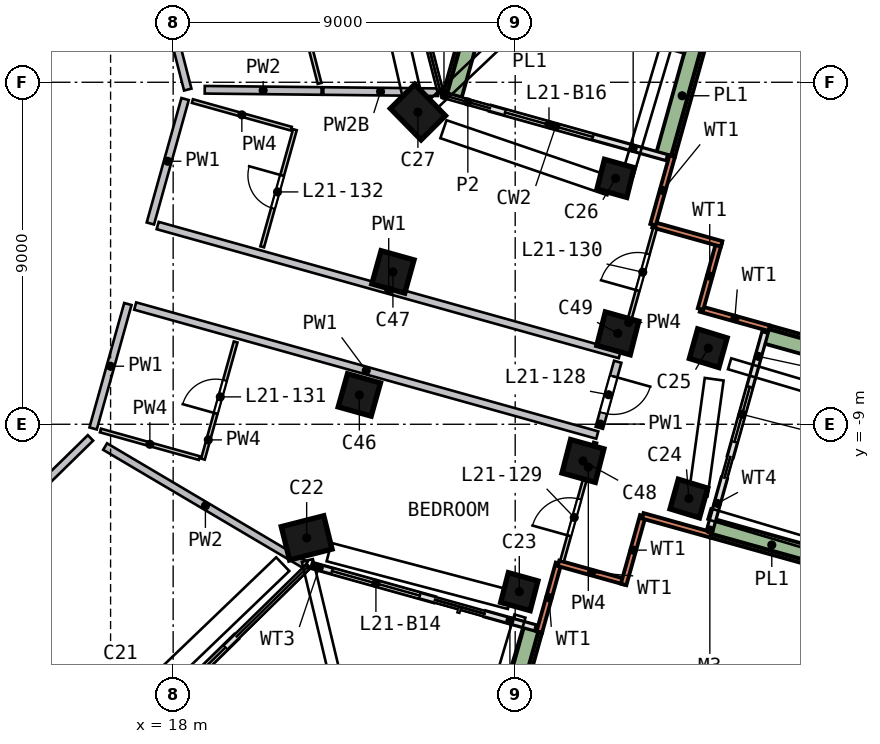
"""IFC4 building model, lengths in metres.
Left out: names, types, materials, properties, quantities, classifications, styles, units other than length and angle.
Written with IfcOpenShell. Run it as: python <this file> out.ifc"""

import sys

from ifc_helpers import new_model, si_unit, direction, frame, frame_2d, origin, origin_2d, place, context, subcontext, project, spatial, rectangle, extrude, element, fill, save


model = new_model("IFC4")
c1 = context("Model", 3, precision=1e-05, world=origin(), true_north=direction((0.0, 1.0)))
c2 = subcontext(c1, "Body", "Model", "MODEL_VIEW")
j1 = project(units=[si_unit("LENGTHUNIT", "METRE"), si_unit("PLANEANGLEUNIT", "RADIAN")], contexts=[c1])
p1 = place(None, origin())
s1 = spatial("IfcSite", under=j1, at=p1, CompositionType="ELEMENT")
p2 = place(p1, origin())
s2 = spatial("IfcBuilding", under=s1, at=p2, CompositionType="ELEMENT")
p3 = place(p2, frame((0.0, 0.0, 93.0)))
s3 = spatial("IfcBuildingStorey", under=s2, at=p3, CompositionType="ELEMENT", Elevation=93.0)
p4 = place(p3, frame((21.444, -12.113, 0.0), z_axis=(0.056777694, 0.102458276, 0.9931156), x_axis=(-0.96720596, -0.24101204, 0.080161264)))
e1 = element("IfcColumn", 1, at=p4, inside=s3, PredefinedType="COLUMN", context=c2, shape_type="SweptSolid", body=[
    extrude(rectangle(XDim=1.15, YDim=0.9, at=origin_2d()), origin(), (0.0, 0.0, 1.0), 3.212),
])
p5 = place(p3, frame((27.215, -13.61, 0.0), z_axis=(-0.087402917, 0.167741453, 0.981948845), x_axis=(0.959938643, -0.249254836, 0.128022764)))
e2 = element("IfcColumn", 2, at=p5, inside=s3, PredefinedType="COLUMN", context=c2, shape_type="SweptSolid", body=[
    extrude(rectangle(XDim=0.8, YDim=0.8, at=origin_2d()), origin(), (0.0, 0.0, 1.0), 3.249),
])
p6 = place(p3, frame((31.692, -11.185, 0.0), z_axis=(-0.098430583, 0.187736141, 0.97727507), x_axis=(0.287692097, 0.945479062, -0.152651894)))
e3 = element("IfcColumn", 3, at=p6, inside=s3, PredefinedType="COLUMN", context=c2, shape_type="SweptSolid", body=[
    extrude(rectangle(XDim=0.8, YDim=0.8, at=origin_2d()), origin(), (0.0, 0.0, 1.0), 3.264),
])
p7 = place(p3, frame((32.225, -7.232, 0.0), z_axis=(-0.116769501, 0.189591887, 0.974894764), x_axis=(0.289566517, 0.945460339, -0.149184381)))
e4 = element("IfcColumn", 4, at=p7, inside=s3, PredefinedType="COLUMN", context=c2, shape_type="SweptSolid", body=[
    extrude(rectangle(XDim=0.8, YDim=0.8, at=origin_2d()), origin(), (0.0, 0.0, 1.0), 3.272),
])
p8 = place(p3, frame((29.812, -2.748, 0.0), z_axis=(-0.137511181, 0.178078471, 0.974360679), x_axis=(-0.954072434, 0.240512077, -0.17860496)))
e5 = element("IfcColumn", 5, at=p8, inside=s3, PredefinedType="COLUMN", context=c2, shape_type="SweptSolid", body=[
    extrude(rectangle(XDim=0.8, YDim=0.8, at=origin_2d()), origin(), (0.0, 0.0, 1.0), 3.274),
])
p9 = place(p3, frame((24.436, -0.926, 0.0), z_axis=(0.003420691, 0.116227489, 0.993216728), x_axis=(0.702265044, -0.707365794, 0.08035821)))
e6 = element("IfcColumn", 6, at=p9, inside=s3, PredefinedType="COLUMN", context=c2, shape_type="SweptSolid", body=[
    extrude(rectangle(XDim=1.15, YDim=0.9, at=origin_2d()), origin(), (0.0, 0.0, 1.0), 3.212),
])
for number, where, z_axis, x_axis in (
    (7, (22.852, -8.36, 0.0), (0.039, 0.109, 0.993), (0.963, -0.27, -0.008)),
    (8, (23.755, -5.127, 0.0), (0.023, 0.113, 0.993), (0.963, -0.268, 0.008)),
):
    element("IfcColumn", number, at=place(p3, frame(where, z_axis=z_axis, x_axis=x_axis)), inside=s3, PredefinedType="COLUMN", context=c2, shape_type="SweptSolid", body=[
        extrude(rectangle(XDim=0.9, YDim=0.9, at=origin_2d()), origin(), (0.0, 0.0, 1.0), 3.211),
    ])
p10 = place(p3, frame((28.91, -10.18, 0.0), z_axis=(-0.103337522, 0.175051814, 0.979121146), x_axis=(0.958440948, -0.245651379, 0.145073602)))
e9 = element("IfcColumn", 9, at=p10, inside=s3, PredefinedType="COLUMN", context=c2, shape_type="SweptSolid", body=[
    extrude(rectangle(XDim=0.9, YDim=0.9, at=origin_2d()), origin(), (0.0, 0.0, 1.0), 3.258),
])
p11 = place(p3, frame((29.846, -6.828, 0.0), z_axis=(-0.118703121, 0.178876933, 0.9766845), x_axis=(0.956551914, -0.243211576, 0.160799766)))
e10 = element("IfcColumn", 10, at=p11, inside=s3, PredefinedType="COLUMN", context=c2, shape_type="SweptSolid", body=[
    extrude(rectangle(XDim=0.9, YDim=0.9, at=origin_2d()), origin(), (0.0, 0.0, 1.0), 3.266),
])
p12 = place(p3, frame((27.635, -14.465, 0.0), z_axis=(0.0, 0.0, 1.0), x_axis=(0.268886057, 0.963171993, 0.0)))
e11 = element("IfcWall", 11, at=p12, inside=s3, PredefinedType="SOLIDWALL", context=c2, shape_type="SweptSolid", body=[
    extrude(rectangle(XDim=1.875, YDim=0.15, at=frame_2d((0.938, 0.0))), origin(), (0.0, 0.0, 1.0), 3.19),
])
p13 = place(p3, frame((28.14, -12.659, 0.0), z_axis=(0.0, 0.0, 1.0), x_axis=(0.963159547, -0.268930637, 0.0)))
e12 = element("IfcWall", 12, at=p13, inside=s3, PredefinedType="SOLIDWALL", context=c2, shape_type="SweptSolid", body=[
    extrude(rectangle(XDim=1.8, YDim=0.15, at=frame_2d((0.9, 0.0))), origin(), (0.0, 0.0, 1.0), 3.19),
])
for number, where, z_axis, x_axis in (
    (13, (29.853, -13.215, 0.0), (0.0, 0.0, 1.0), (0.269, 0.963, 0.0)),
    (14, (30.357, -11.409, 0.0), (0.0, 0.0, 1.0), (0.963, -0.269, 0.0)),
    (15, (33.683, -6.471, 0.0), (0.0, 0.0, 1.0), (-0.963, 0.269, 0.0)),
):
    element("IfcWall", number, at=place(p3, frame(where, z_axis=z_axis, x_axis=x_axis)), inside=s3, PredefinedType="SOLIDWALL", context=c2, shape_type="SweptSolid", body=[
        extrude(rectangle(XDim=1.875, YDim=0.15, at=frame_2d((0.938, 0.0))), origin(), (0.0, 0.0, 1.0), 3.19),
    ])
p14 = place(p3, frame((31.877, -5.967, 0.0), z_axis=(0.0, 0.0, 1.0), x_axis=(0.268839939, 0.963184867, 0.0)))
e16 = element("IfcWall", 16, at=p14, inside=s3, PredefinedType="SOLIDWALL", context=c2, shape_type="SweptSolid", body=[
    extrude(rectangle(XDim=1.8, YDim=0.15, at=frame_2d((0.9, 0.0))), origin(), (0.0, 0.0, 1.0), 3.19),
])
p15 = place(p3, frame((32.433, -4.254, 0.0), z_axis=(0.0, 0.0, 1.0), x_axis=(-0.963171993, 0.268886057, 0.0)))
e17 = element("IfcWall", 17, at=p15, inside=s3, PredefinedType="SOLIDWALL", context=c2, shape_type="SweptSolid", body=[
    extrude(rectangle(XDim=1.875, YDim=0.15, at=frame_2d((0.938, 0.0))), origin(), (0.0, 0.0, 1.0), 3.19),
])
p16 = place(p3, frame((30.627, -3.75, 0.0), z_axis=(0.0, 0.0, 1.0), x_axis=(0.268973117, 0.963147685, 0.0)))
e18 = element("IfcWall", 18, at=p16, inside=s3, PredefinedType="SOLIDWALL", context=c2, shape_type="SweptSolid", body=[
    extrude(rectangle(XDim=1.875, YDim=0.15, at=frame_2d((0.938, 0.0))), origin(), (0.0, 0.0, 1.0), 3.19),
])
p17 = place(p3, frame((16.92, -17.278, 0.0), z_axis=(0.0, 0.0, 1.0), x_axis=(0.714483248, 0.699652549, 0.0)))
e19 = element("IfcWall", 19, at=p17, inside=s3, PredefinedType="SOLIDWALL", context=c2, shape_type="SweptSolid", body=[
    extrude(rectangle(XDim=3.836, YDim=0.15, at=frame_2d((1.918, 0.0))), origin(), (0.0, 0.0, 1.0), 2.425),
])
p18 = place(p17, frame((1.035, 0.0, 0.0)))
e20 = element("IfcOpeningElement", 20, at=p18, cuts=e19, PredefinedType="OPENING", context=c2, shape_type="SweptSolid", body=[
    extrude(rectangle(XDim=2.4, YDim=2.4, at=frame_2d((1.2, 1.2))), frame((0.0, 0.085, 0.0), z_axis=(0.0, -1.0, 0.0), x_axis=(1.0, 0.0, 0.0)), (0.0, 0.0, 1.0), 0.17),
])
p19 = place(p3, frame((21.704, -12.731, 0.0), z_axis=(0.0, 0.0, 1.0), x_axis=(0.963162375, -0.268920509, 0.0)))
e21 = element("IfcWall", 21, at=p19, inside=s3, PredefinedType="SOLIDWALL", context=c2, shape_type="SweptSolid", body=[
    extrude(rectangle(XDim=3.294, YDim=0.15, at=frame_2d((1.647, 0.0))), origin(), (0.0, 0.0, 1.0), 2.425),
])
p20 = place(p19, frame((0.494, 0.0, 0.0)))
e22 = element("IfcOpeningElement", 22, at=p20, cuts=e21, PredefinedType="OPENING", context=c2, shape_type="SweptSolid", body=[
    extrude(rectangle(XDim=2.4, YDim=2.4, at=frame_2d((1.2, 1.2))), frame((0.0, 0.085, 0.0), z_axis=(0.0, -1.0, 0.0), x_axis=(1.0, 0.0, 0.0)), (0.0, 0.0, 1.0), 0.17),
])
p21 = place(p3, frame((26.206, -13.988, 0.0), z_axis=(0.0, 0.0, 1.0), x_axis=(0.96315954, -0.26893066, 0.0)))
e23 = element("IfcWall", 23, at=p21, inside=s3, PredefinedType="SOLIDWALL", context=c2, shape_type="SweptSolid", body=[
    extrude(rectangle(XDim=1.36, YDim=0.15, at=frame_2d((0.68, 0.0))), origin(), (0.0, 0.0, 1.0), 2.425),
])
p22 = place(p3, frame((32.663, -9.846, 0.0), z_axis=(0.0, 0.0, 1.0), x_axis=(0.268917758, 0.963163143, 0.0)))
e24 = element("IfcWall", 24, at=p22, inside=s3, PredefinedType="SOLIDWALL", context=c2, shape_type="SweptSolid", body=[
    extrude(rectangle(XDim=3.37, YDim=0.15, at=frame_2d((1.685, 0.0))), origin(), (0.0, 0.0, 1.0), 2.425),
])
p23 = place(p22, frame((0.4, 0.0, 0.0)))
e25 = element("IfcOpeningElement", 25, at=p23, cuts=e24, PredefinedType="OPENING", context=c2, shape_type="SweptSolid", body=[
    extrude(rectangle(XDim=1.5, YDim=2.4, at=frame_2d((0.75, 1.2))), frame((0.0, 0.085, 0.0), z_axis=(0.0, -1.0, 0.0), x_axis=(1.0, 0.0, 0.0)), (0.0, 0.0, 1.0), 0.17),
])
p24 = place(p3, frame((32.133, -11.744, 0.0), z_axis=(0.0, 0.0, 1.0), x_axis=(0.268990627, 0.963142794, 0.0)))
e26 = element("IfcWall", 26, at=p24, inside=s3, PredefinedType="SOLIDWALL", context=c2, shape_type="SweptSolid", body=[
    extrude(rectangle(XDim=1.374, YDim=0.15, at=frame_2d((0.687, 0.0))), origin(), (0.0, 0.0, 1.0), 2.425),
])
p25 = place(p3, frame((30.972, -1.977, 0.0), z_axis=(0.0, 0.0, 1.0), x_axis=(-0.963157095, 0.268939419, 0.0)))
e27 = element("IfcWall", 27, at=p25, inside=s3, PredefinedType="SOLIDWALL", context=c2, shape_type="SweptSolid", body=[
    extrude(rectangle(XDim=4.8, YDim=0.15, at=frame_2d((2.4, 0.0))), origin(), (0.0, 0.0, 1.0), 2.425),
])
p26 = place(p25, frame((2.0, 0.0, 0.0)))
e28 = element("IfcOpeningElement", 28, at=p26, cuts=e27, PredefinedType="OPENING", context=c2, shape_type="SweptSolid", body=[
    extrude(rectangle(XDim=2.4, YDim=2.4, at=frame_2d((1.2, 1.2))), frame((0.0, 0.085, 0.0), z_axis=(0.0, -1.0, 0.0), x_axis=(1.0, 0.0, 0.0)), (0.0, 0.0, 1.0), 0.17),
])
p27 = place(p3, frame((26.741, -17.018, 0.0), z_axis=(0.0, 0.0, 1.0), x_axis=(0.268921917, 0.963161982, 0.0)))
e29 = element("IfcWall", 29, at=p27, inside=s3, PredefinedType="SOLIDWALL", context=c2, shape_type="SweptSolid", body=[
    extrude(rectangle(XDim=2.699, YDim=0.5, at=frame_2d((1.35, 0.0))), origin(), (0.0, 0.0, 1.0), 0.7),
])
p28 = place(p3, frame((32.211, -11.745, 0.0), z_axis=(0.0, 0.0, 1.0), x_axis=(0.963159533, -0.268930686, 0.0)))
e30 = element("IfcWall", 30, at=p28, inside=s3, PredefinedType="SOLIDWALL", context=c2, shape_type="SweptSolid", body=[
    extrude(rectangle(XDim=3.199, YDim=0.5, at=frame_2d((1.6, 0.0))), origin(), (0.0, 0.0, 1.0), 0.7),
])
p29 = place(p3, frame((36.236, -7.366, 0.0), z_axis=(0.0, 0.0, 1.0), x_axis=(-0.963161982, 0.268921917, 0.0)))
e31 = element("IfcWall", 31, at=p29, inside=s3, PredefinedType="SOLIDWALL", context=c2, shape_type="SweptSolid", body=[
    extrude(rectangle(XDim=2.699, YDim=0.5, at=frame_2d((1.35, 0.0))), origin(), (0.0, 0.0, 1.0), 0.7),
])
p30 = place(p3, frame((30.963, -1.896, 0.0), z_axis=(0.0, 0.0, 1.0), x_axis=(0.268930686, 0.963159533, 0.0)))
e32 = element("IfcWall", 32, at=p30, inside=s3, PredefinedType="SOLIDWALL", context=c2, shape_type="SweptSolid", body=[
    extrude(rectangle(XDim=3.199, YDim=0.5, at=frame_2d((1.6, 0.0))), origin(), (0.0, 0.0, 1.0), 0.7),
])
p31 = place(p3, frame((31.515, 1.012, 0.0), z_axis=(0.0, 0.0, 1.0), x_axis=(-0.963162724, 0.268919258, 0.0)))
e33 = element("IfcWall", 33, at=p31, inside=s3, PredefinedType="SOLIDWALL", context=c2, shape_type="SweptSolid", body=[
    extrude(rectangle(XDim=5.824, YDim=0.5, at=frame_2d((2.912, 0.0))), origin(), (0.0, 0.0, 1.0), 0.7),
])
p32 = place(p3, frame((26.08, 2.27, 0.0), z_axis=(0.0, 0.0, 1.0), x_axis=(-0.268921917, -0.963161982, 0.0)))
e34 = element("IfcWall", 34, at=p32, inside=s3, PredefinedType="SOLIDWALL", context=c2, shape_type="SweptSolid", body=[
    extrude(rectangle(XDim=2.699, YDim=0.5, at=frame_2d((1.35, 0.0))), origin(), (0.0, 0.0, 1.0), 0.7),
])
p33 = place(p3, frame((9.025, -16.017, 0.0), z_axis=(0.0, 0.0, 1.0), x_axis=(0.714482371, 0.699653444, 0.0)))
e35 = element("IfcWall", 35, at=p33, inside=s3, PredefinedType="SOLIDWALL", context=c2, shape_type="SweptSolid", body=[
    extrude(rectangle(XDim=9.516, YDim=0.2, at=frame_2d((4.758, 0.0))), origin(), (0.0, 0.0, 1.0), 3.19),
])
p34 = place(p3, frame((15.894, -9.11, 0.0), z_axis=(0.0, 0.0, 1.0), x_axis=(0.268902762, 0.963167329, 0.0)))
e36 = element("IfcWall", 36, at=p34, inside=s3, PredefinedType="SOLIDWALL", context=c2, shape_type="SweptSolid", body=[
    extrude(rectangle(XDim=3.4, YDim=0.2, at=frame_2d((1.7, 0.0))), origin(), (0.0, 0.0, 1.0), 3.19),
])
p35 = place(p3, frame((16.012, 9.044, 0.0), z_axis=(0.0, 0.0, 1.0), x_axis=(0.248687002, -0.968583902, 0.0)))
e37 = element("IfcWall", 37, at=p35, inside=s3, PredefinedType="SOLIDWALL", context=c2, shape_type="SweptSolid", body=[
    extrude(rectangle(XDim=9.536, YDim=0.2, at=frame_2d((4.768, 0.0))), origin(), (0.0, 0.0, 1.0), 3.19),
])
p36 = place(p35, frame((5.15, 0.0, 0.0)))
e38 = element("IfcOpeningElement", 38, at=p36, cuts=e37, PredefinedType="OPENING", context=c2, shape_type="SweptSolid", body=[
    extrude(rectangle(XDim=1.0, YDim=2.1, at=frame_2d((0.5, 1.05))), frame((0.0, 0.11, 0.0), z_axis=(0.0, -1.0, 0.0), x_axis=(1.0, 0.0, 0.0)), (0.0, 0.0, 1.0), 0.22),
])
p37 = place(p3, frame((17.4, -3.716, 0.0), z_axis=(0.0, 0.0, 1.0), x_axis=(0.26892136, 0.963162137, 0.0)))
e39 = element("IfcWall", 39, at=p37, inside=s3, PredefinedType="SOLIDWALL", context=c2, shape_type="SweptSolid", body=[
    extrude(rectangle(XDim=3.4, YDim=0.2, at=frame_2d((1.7, 0.0))), origin(), (0.0, 0.0, 1.0), 3.19),
])
p38 = place(p3, frame((17.001, -5.889, 0.0), z_axis=(0.0, 0.0, 1.0), x_axis=(0.963163806, -0.268915381, 0.0)))
e40 = element("IfcWall", 40, at=p38, inside=s3, PredefinedType="SOLIDWALL", context=c2, shape_type="SweptSolid", body=[
    extrude(rectangle(XDim=12.624, YDim=0.2, at=frame_2d((6.312, 0.0))), origin(), (0.0, 0.0, 1.0), 3.19),
])
p39 = place(p3, frame((29.752, -7.165, 0.0), z_axis=(0.0, 0.0, 1.0), x_axis=(-0.963165205, 0.268910372, 0.0)))
e41 = element("IfcWall", 41, at=p39, inside=s3, PredefinedType="SOLIDWALL", context=c2, shape_type="SweptSolid", body=[
    extrude(rectangle(XDim=12.624, YDim=0.2, at=frame_2d((6.312, 0.0))), origin(), (0.0, 0.0, 1.0), 3.19),
])
p40 = place(p3, frame((29.698, -7.355, 0.0), z_axis=(0.0, 0.0, 1.0), x_axis=(-0.268907002, -0.963166146, 0.0)))
e42 = element("IfcWall", 42, at=p40, inside=s3, PredefinedType="SOLIDWALL", context=c2, shape_type="SweptSolid", body=[
    extrude(rectangle(XDim=1.804, YDim=0.2, at=frame_2d((0.902, 0.0))), origin(), (0.0, 0.0, 1.0), 3.19),
])
p41 = place(p40, frame((0.4, 0.0, 0.0)))
e43 = element("IfcOpeningElement", 43, at=p41, cuts=e42, PredefinedType="OPENING", context=c2, shape_type="SweptSolid", body=[
    extrude(rectangle(XDim=1.0, YDim=2.1, at=frame_2d((0.5, 1.05))), frame((0.0, 0.11, 0.0), z_axis=(0.0, -1.0, 0.0), x_axis=(1.0, 0.0, 0.0)), (0.0, 0.0, 1.0), 0.22),
])
p42 = place(p3, frame((16.209, -9.586, 0.0), z_axis=(0.0, 0.0, 1.0), x_axis=(0.860732275, -0.509057906, 0.0)))
e44 = element("IfcWall", 44, at=p42, inside=s3, PredefinedType="SOLIDWALL", context=c2, shape_type="SweptSolid", body=[
    extrude(rectangle(XDim=6.132, YDim=0.2, at=frame_2d((3.066, 0.0))), origin(), (0.0, 0.0, 1.0), 3.19),
])
p43 = place(p3, frame((18.831, -0.197, 0.0), z_axis=(0.0, 0.0, 1.0), x_axis=(0.999945068, -0.010481438, 0.0)))
e45 = element("IfcWall", 45, at=p43, inside=s3, PredefinedType="SOLIDWALL", context=c2, shape_type="SweptSolid", body=[
    extrude(rectangle(XDim=3.075, YDim=0.2, at=frame_2d((1.537, 0.0))), origin(), (0.0, 0.0, 1.0), 3.19),
])
p44 = place(p3, frame((21.951, -0.23, 0.0), z_axis=(0.0, 0.0, 1.0), x_axis=(0.99994531, -0.010458322, 0.0)))
e46 = element("IfcWall", 46, at=p44, inside=s3, PredefinedType="SOLIDWALL", context=c2, shape_type="SweptSolid", body=[
    extrude(rectangle(XDim=3.011, YDim=0.2, at=frame_2d((1.506, 0.0))), origin(), (0.0, 0.0, 1.0), 2.69),
])
p45 = place(p3, frame((16.087, -9.164, 0.0), z_axis=(0.0, 0.0, 1.0), x_axis=(0.963164718, -0.268912117, 0.0)))
e47 = element("IfcWall", 47, at=p45, inside=s3, PredefinedType="PARTITIONING", context=c2, shape_type="SweptSolid", body=[
    extrude(rectangle(XDim=2.7, YDim=0.1, at=frame_2d((1.35, 0.0))), origin(), (0.0, 0.0, 1.0), 3.19),
])
p46 = place(p3, frame((18.783, -9.917, 0.0), z_axis=(0.0, 0.0, 1.0), x_axis=(0.268942177, 0.963156324, 0.0)))
e48 = element("IfcWall", 48, at=p46, inside=s3, PredefinedType="PARTITIONING", context=c2, shape_type="SweptSolid", body=[
    extrude(rectangle(XDim=3.2, YDim=0.1, at=frame_2d((1.6, 0.0))), origin(), (0.0, 0.0, 1.0), 3.19),
])
p47 = place(p46, frame((1.25, 0.0, 0.0)))
e49 = element("IfcOpeningElement", 49, at=p47, cuts=e48, PredefinedType="OPENING", context=c2, shape_type="SweptSolid", body=[
    extrude(rectangle(XDim=0.9, YDim=2.1, at=frame_2d((0.45, 1.05))), frame((0.0, 0.06, 0.0), z_axis=(0.0, -1.0, 0.0), x_axis=(1.0, 0.0, 0.0)), (0.0, 0.0, 1.0), 0.12),
])
p48 = place(p3, frame((21.107, -1.221, 0.0), z_axis=(0.0, 0.0, 1.0), x_axis=(-0.963164718, 0.268912117, 0.0)))
e50 = element("IfcWall", 50, at=p48, inside=s3, PredefinedType="PARTITIONING", context=c2, shape_type="SweptSolid", body=[
    extrude(rectangle(XDim=2.7, YDim=0.1, at=frame_2d((1.35, 0.0))), origin(), (0.0, 0.0, 1.0), 3.19),
])
p49 = place(p3, frame((20.343, -4.33, 0.0), z_axis=(0.0, 0.0, 1.0), x_axis=(0.268942177, 0.963156324, 0.0)))
e51 = element("IfcWall", 51, at=p49, inside=s3, PredefinedType="PARTITIONING", context=c2, shape_type="SweptSolid", body=[
    extrude(rectangle(XDim=3.2, YDim=0.1, at=frame_2d((1.6, 0.0))), origin(), (0.0, 0.0, 1.0), 3.19),
])
p50 = place(p49, frame((1.05, 0.0, 0.0)))
e52 = element("IfcOpeningElement", 52, at=p50, cuts=e51, PredefinedType="OPENING", context=c2, shape_type="SweptSolid", body=[
    extrude(rectangle(XDim=0.9, YDim=2.1, at=frame_2d((0.45, 1.05))), frame((0.0, 0.06, 0.0), z_axis=(0.0, -1.0, 0.0), x_axis=(1.0, 0.0, 0.0)), (0.0, 0.0, 1.0), 0.12),
])
p51 = place(p3, frame((20.931, 3.559, 0.0), z_axis=(0.0, 0.0, 1.0), x_axis=(0.24868774, -0.968583712, 0.0)))
e53 = element("IfcWall", 53, at=p51, inside=s3, PredefinedType="PARTITIONING", context=c2, shape_type="SweptSolid", body=[
    extrude(rectangle(XDim=3.704, YDim=0.1, at=frame_2d((1.852, 0.0))), origin(), (0.0, 0.0, 1.0), 3.19),
])
p52 = place(p3, frame((28.232, -12.608, 0.0), z_axis=(0.0, 0.0, 1.0), x_axis=(0.268925312, 0.963161034, 0.0)))
e54 = element("IfcWall", 54, at=p52, inside=s3, PredefinedType="PARTITIONING", context=c2, shape_type="SweptSolid", body=[
    extrude(rectangle(XDim=3.252, YDim=0.1, at=frame_2d((1.626, 0.0))), origin(), (0.0, 0.0, 1.0), 3.19),
])
p53 = place(p52, frame((0.7, 0.0, 0.0)))
e55 = element("IfcOpeningElement", 55, at=p53, cuts=e54, PredefinedType="OPENING", context=c2, shape_type="SweptSolid", body=[
    extrude(rectangle(XDim=1.0, YDim=2.1, at=frame_2d((0.5, 1.05))), frame((0.0, 0.06, 0.0), z_axis=(0.0, -1.0, 0.0), x_axis=(1.0, 0.0, 0.0)), (0.0, 0.0, 1.0), 0.12),
])
p54 = place(p3, frame((29.805, -6.972, 0.0), z_axis=(0.0, 0.0, 1.0), x_axis=(0.268905867, 0.963166463, 0.0)))
e56 = element("IfcWall", 56, at=p54, inside=s3, PredefinedType="PARTITIONING", context=c2, shape_type="SweptSolid", body=[
    extrude(rectangle(XDim=3.252, YDim=0.1, at=frame_2d((1.626, 0.0))), origin(), (0.0, 0.0, 1.0), 3.19),
])
p55 = place(p54, frame((1.55, 0.0, 0.0)))
e57 = element("IfcOpeningElement", 57, at=p55, cuts=e56, PredefinedType="OPENING", context=c2, shape_type="SweptSolid", body=[
    extrude(rectangle(XDim=1.0, YDim=2.1, at=frame_2d((0.5, 1.05))), frame((0.0, 0.06, 0.0), z_axis=(0.0, -1.0, 0.0), x_axis=(1.0, 0.0, 0.0)), (0.0, 0.0, 1.0), 0.12),
])
p56 = place(p18, origin())
e58 = element("IfcDoor", 58, at=p56, inside=s3, OperationType="SLIDING_TO_LEFT", PredefinedType="DOOR", context=c2, shape_type="SweptSolid", body=[
    extrude(rectangle(XDim=2.4, YDim=2.4, at=frame_2d((1.2, 1.2))), frame((0.0, 0.025, 0.0), z_axis=(0.0, -1.0, 0.0), x_axis=(1.0, 0.0, 0.0)), (0.0, 0.0, 1.0), 0.05),
])
fill(e20, e58)
p57 = place(p20, origin())
e59 = element("IfcDoor", 59, at=p57, inside=s3, OperationType="SLIDING_TO_LEFT", PredefinedType="DOOR", context=c2, shape_type="SweptSolid", body=[
    extrude(rectangle(XDim=2.4, YDim=2.4, at=frame_2d((1.2, 1.2))), frame((0.0, 0.025, 0.0), z_axis=(0.0, -1.0, 0.0), x_axis=(1.0, 0.0, 0.0)), (0.0, 0.0, 1.0), 0.05),
])
fill(e22, e59)
p58 = place(p23, origin())
e60 = element("IfcDoor", 60, at=p58, inside=s3, OperationType="SLIDING_TO_RIGHT", PredefinedType="DOOR", context=c2, shape_type="SweptSolid", body=[
    extrude(rectangle(XDim=1.5, YDim=2.4, at=frame_2d((0.75, 1.2))), frame((0.0, 0.025, 0.0), z_axis=(0.0, -1.0, 0.0), x_axis=(1.0, 0.0, 0.0)), (0.0, 0.0, 1.0), 0.05),
])
fill(e25, e60)
p59 = place(p26, origin())
e61 = element("IfcDoor", 61, at=p59, inside=s3, OperationType="SLIDING_TO_LEFT", PredefinedType="DOOR", context=c2, shape_type="SweptSolid", body=[
    extrude(rectangle(XDim=2.4, YDim=2.4, at=frame_2d((1.2, 1.2))), frame((0.0, 0.025, 0.0), z_axis=(0.0, -1.0, 0.0), x_axis=(1.0, 0.0, 0.0)), (0.0, 0.0, 1.0), 0.05),
])
fill(e28, e61)
p60 = place(p41, origin())
e62 = element("IfcDoor", 62, at=p60, inside=s3, OperationType="SINGLE_SWING_LEFT", PredefinedType="DOOR", context=c2, shape_type="SweptSolid", body=[
    extrude(rectangle(XDim=1.0, YDim=2.1, at=frame_2d((0.5, 1.05))), frame((0.0, 0.025, 0.0), z_axis=(0.0, -1.0, 0.0), x_axis=(1.0, 0.0, 0.0)), (0.0, 0.0, 1.0), 0.05),
])
fill(e43, e62)
p61 = place(p53, origin())
e63 = element("IfcDoor", 63, at=p61, inside=s3, OperationType="SINGLE_SWING_LEFT", PredefinedType="DOOR", context=c2, shape_type="SweptSolid", body=[
    extrude(rectangle(XDim=1.0, YDim=2.1, at=frame_2d((0.5, 1.05))), frame((0.0, 0.025, 0.0), z_axis=(0.0, -1.0, 0.0), x_axis=(1.0, 0.0, 0.0)), (0.0, 0.0, 1.0), 0.05),
])
fill(e55, e63)
p62 = place(p55, origin())
e64 = element("IfcDoor", 64, at=p62, inside=s3, OperationType="SINGLE_SWING_LEFT", PredefinedType="DOOR", context=c2, shape_type="SweptSolid", body=[
    extrude(rectangle(XDim=1.0, YDim=2.1, at=frame_2d((0.5, 1.05))), frame((0.0, 0.025, 0.0), z_axis=(0.0, -1.0, 0.0), x_axis=(1.0, 0.0, 0.0)), (0.0, 0.0, 1.0), 0.05),
])
fill(e57, e64)
p63 = place(p47, origin())
e65 = element("IfcDoor", 65, at=p63, inside=s3, OperationType="SINGLE_SWING_LEFT", PredefinedType="DOOR", context=c2, shape_type="SweptSolid", body=[
    extrude(rectangle(XDim=0.9, YDim=2.1, at=frame_2d((0.45, 1.05))), frame((0.0, 0.025, 0.0), z_axis=(0.0, -1.0, 0.0), x_axis=(1.0, 0.0, 0.0)), (0.0, 0.0, 1.0), 0.05),
])
fill(e49, e65)
p64 = place(p50, origin())
e66 = element("IfcDoor", 66, at=p64, inside=s3, OperationType="SINGLE_SWING_RIGHT", PredefinedType="DOOR", context=c2, shape_type="SweptSolid", body=[
    extrude(rectangle(XDim=0.9, YDim=2.1, at=frame_2d((0.45, 1.05))), frame((0.0, 0.025, 0.0), z_axis=(0.0, -1.0, 0.0), x_axis=(1.0, 0.0, 0.0)), (0.0, 0.0, 1.0), 0.05),
])
fill(e52, e66)
save(model, sys.argv[1])
